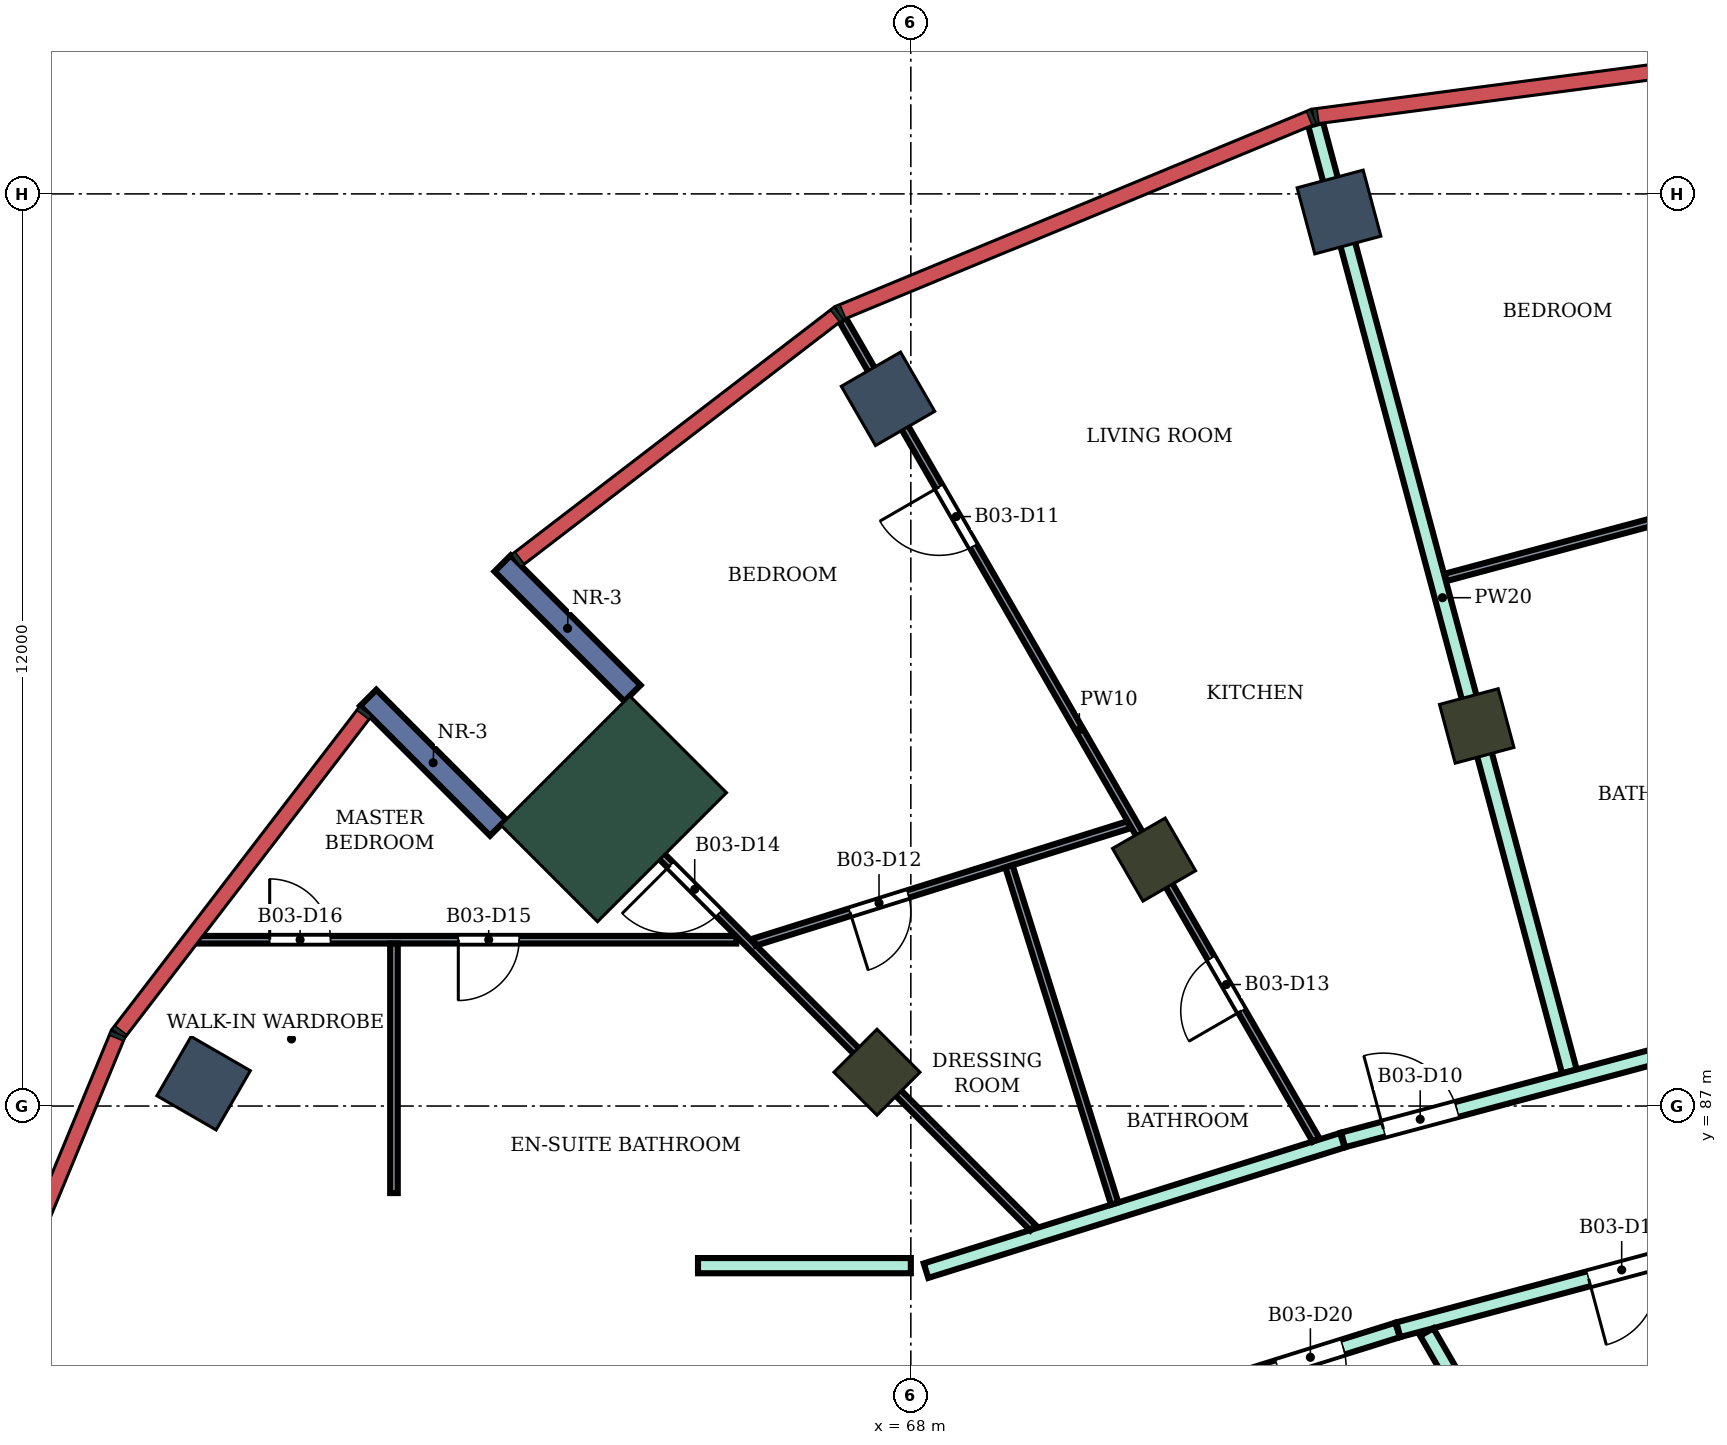
"""IFC4 building model, lengths in metres.
Left out: names, types, materials, properties, quantities, classifications, styles, units other than length and angle.
Written with IfcOpenShell. Run it as: python <this file> out.ifc"""

import sys

from ifc_helpers import new_model, si_unit, direction, frame, frame_2d, origin, origin_2d, place, context, subcontext, project, spatial, rectangle, extrude, element, fill, save


model = new_model("IFC4")
c1 = context("Model", 3, precision=1e-05, world=origin(), true_north=direction((0.0, 1.0)))
c2 = subcontext(c1, "Body", "Model", "MODEL_VIEW")
j1 = project(units=[si_unit("LENGTHUNIT", "METRE"), si_unit("PLANEANGLEUNIT", "RADIAN")], contexts=[c1])
p1 = place(None, origin())
s1 = spatial("IfcSite", under=j1, at=p1, CompositionType="ELEMENT")
p2 = place(p1, origin())
s2 = spatial("IfcBuilding", under=s1, at=p2, CompositionType="ELEMENT")
p3 = place(p2, frame((0.0, 0.0, 241.5)))
s3 = spatial("IfcBuildingStorey", under=s2, at=p3, CompositionType="ELEMENT", Elevation=241.5)
for number, where, z_axis, x_axis in (
    (1, (73.633, 98.762, 0.0), (0.0, 0.0, 1.0), (-0.259, 0.966, 0.0)),
    (2, (67.7, 96.304, 0.0), (0.0, 0.0, 1.0), (-0.5, 0.866, 0.0)),
    (3, (58.696, 87.3, 0.0), (0.0, 0.0, 1.0), (-0.866, 0.5, 0.0)),
):
    element("IfcColumn", number, at=place(p3, frame(where, z_axis=z_axis, x_axis=x_axis)), inside=s3, PredefinedType="COLUMN", context=c2, shape_type="SweptSolid", body=[
        extrude(rectangle(XDim=0.9, YDim=0.9, at=origin_2d()), origin(), (0.0, 0.0, 1.0), 4.2),
    ])
for number, where, z_axis, x_axis in (
    (4, (75.445, 92.0, 0.0), (0.0, 0.0, 1.0), (-0.259, 0.966, 0.0)),
    (5, (71.2, 90.242, 0.0), (0.0, 0.0, 1.0), (-0.5, 0.866, 0.0)),
    (6, (67.555, 87.445, 0.0), (0.0, 0.0, 1.0), (-0.707, 0.707, 0.0)),
):
    element("IfcColumn", number, at=place(p3, frame(where, z_axis=z_axis, x_axis=x_axis)), inside=s3, PredefinedType="COLUMN", context=c2, shape_type="SweptSolid", body=[
        extrude(rectangle(XDim=0.8, YDim=0.8, at=origin_2d()), origin(), (0.0, 0.0, 1.0), 4.2),
    ])
p4 = place(p3, frame((64.09, 90.91, 0.0), z_axis=(0.0, 0.0, 1.0), x_axis=(-0.707106781187, 0.707106781187, 0.0)))
e7 = element("IfcColumn", 7, at=p4, inside=s3, PredefinedType="COLUMN", context=c2, shape_type="SweptSolid", body=[
    extrude(rectangle(XDim=1.8, YDim=2.4, at=origin_2d()), origin(), (0.0, 0.0, 1.0), 4.2),
])
for number, where, z_axis, x_axis in (
    (8, (64.338, 92.43, 0.0), (0.0, 0.0, 1.0), (-0.707, 0.707, 0.0)),
    (9, (62.57, 90.662, 0.0), (0.0, 0.0, 1.0), (-0.707, 0.707, 0.0)),
):
    element("IfcWall", number, at=place(p3, frame(where, z_axis=z_axis, x_axis=x_axis)), inside=s3, PredefinedType="NOTDEFINED", context=c2, shape_type="SweptSolid", body=[
        extrude(rectangle(XDim=2.416, YDim=0.3, at=frame_2d((1.208, 0.0))), origin(), (0.0, 0.0, 1.0), 4.2),
    ])
p5 = place(p3, frame((65.2, 84.9, 0.0), z_axis=(0.0, 0.0, 1.0), x_axis=(1.0, 0.0, 0.0)))
e10 = element("IfcWall", 10, at=p5, inside=s3, PredefinedType="PARTITIONING", context=c2, shape_type="SweptSolid", body=[
    extrude(rectangle(XDim=2.8, YDim=0.2, at=frame_2d((1.4, 0.0))), origin(), (0.0, 0.0, 1.0), 3.75),
])
p6 = place(p3, frame((68.2, 84.834, 0.0), z_axis=(0.0, 0.0, 1.0), x_axis=(0.954272398161, 0.298938438661, 0.0)))
e11 = element("IfcWall", 11, at=p6, inside=s3, PredefinedType="PARTITIONING", context=c2, shape_type="SweptSolid", body=[
    extrude(rectangle(XDim=5.74, YDim=0.2, at=frame_2d((2.87, 0.0))), origin(), (0.0, 0.0, 1.0), 3.75),
])
p7 = place(p3, frame((72.1, 83.332, 0.0), z_axis=(0.0, 0.0, 1.0), x_axis=(0.954233106619, 0.299063836383, 0.0)))
e12 = element("IfcWall", 12, at=p7, inside=s3, PredefinedType="PARTITIONING", context=c2, shape_type="SweptSolid", body=[
    extrude(rectangle(XDim=2.414, YDim=0.2, at=frame_2d((1.207, 0.0))), origin(), (0.0, 0.0, 1.0), 3.75),
])
p8 = place(p7, frame((0.762, 0.0, 0.0)))
e13 = element("IfcOpeningElement", 13, at=p8, cuts=e12, PredefinedType="OPENING", context=c2, shape_type="SweptSolid", body=[
    extrude(rectangle(XDim=0.9, YDim=2.1, at=frame_2d((0.45, 1.05))), frame((0.0, 0.11, 0.0), z_axis=(0.0, -1.0, 0.0), x_axis=(1.0, 0.0, 0.0)), (0.0, 0.0, 1.0), 0.22),
])
p9 = place(p3, frame((73.325, 99.92, 0.0), z_axis=(0.0, 0.0, 1.0), x_axis=(0.258745857482, -0.965945433881, 0.0)))
e14 = element("IfcWall", 14, at=p9, inside=s3, PredefinedType="PARTITIONING", context=c2, shape_type="SweptSolid", body=[
    extrude(rectangle(XDim=12.904, YDim=0.2, at=frame_2d((6.452, 0.0))), origin(), (0.0, 0.0, 1.0), 3.75),
])
p10 = place(p3, frame((73.687, 86.554, 0.0), z_axis=(0.0, 0.0, 1.0), x_axis=(0.96595928904, 0.258694128106, 0.0)))
e15 = element("IfcWall", 15, at=p10, inside=s3, PredefinedType="PARTITIONING", context=c2, shape_type="SweptSolid", body=[
    extrude(rectangle(XDim=6.496, YDim=0.2, at=frame_2d((3.248, 0.0))), origin(), (0.0, 0.0, 1.0), 3.75),
])
p11 = place(p10, frame((0.55, 0.0, 0.0)))
e16 = element("IfcOpeningElement", 16, at=p11, cuts=e15, PredefinedType="OPENING", context=c2, shape_type="SweptSolid", body=[
    extrude(rectangle(XDim=1.0, YDim=2.1, at=frame_2d((0.5, 1.05))), frame((0.0, 0.11, 0.0), z_axis=(0.0, -1.0, 0.0), x_axis=(1.0, 0.0, 0.0)), (0.0, 0.0, 1.0), 0.22),
])
p12 = place(p3, frame((74.413, 84.057, 0.0), z_axis=(0.0, 0.0, 1.0), x_axis=(0.965972135939, 0.258646153246, 0.0)))
e17 = element("IfcWall", 17, at=p12, inside=s3, PredefinedType="PARTITIONING", context=c2, shape_type="SweptSolid", body=[
    extrude(rectangle(XDim=5.654, YDim=0.2, at=frame_2d((2.827, 0.0))), origin(), (0.0, 0.0, 1.0), 3.75),
])
p13 = place(p12, frame((2.593, 0.0, 0.0)))
e18 = element("IfcOpeningElement", 18, at=p13, cuts=e17, PredefinedType="OPENING", context=c2, shape_type="SweptSolid", body=[
    extrude(rectangle(XDim=0.9, YDim=2.1, at=frame_2d((0.45, 1.05))), frame((0.0, 0.11, 0.0), z_axis=(0.0, -1.0, 0.0), x_axis=(1.0, 0.0, 0.0)), (0.0, 0.0, 1.0), 0.22),
])
p14 = place(p3, frame((74.787, 84.027, 0.0), z_axis=(0.0, 0.0, 1.0), x_axis=(0.500079107518, -0.86597972622, 0.0)))
e19 = element("IfcWall", 19, at=p14, inside=s3, PredefinedType="PARTITIONING", context=c2, shape_type="SweptSolid", body=[
    extrude(rectangle(XDim=2.726, YDim=0.2, at=frame_2d((1.363, 0.0))), origin(), (0.0, 0.0, 1.0), 3.75),
])
p15 = place(p3, frame((58.6, 89.188, 0.0), z_axis=(0.0, 0.0, 1.0), x_axis=(1.0, 0.0, 0.0)))
e20 = element("IfcWall", 20, at=p15, inside=s3, PredefinedType="PARTITIONING", context=c2, shape_type="SweptSolid", body=[
    extrude(rectangle(XDim=7.103, YDim=0.1, at=frame_2d((3.551, 0.0))), origin(), (0.0, 0.0, 1.0), 3.75),
])
p16 = place(p15, frame((3.447, 0.0, 0.0)))
e21 = element("IfcOpeningElement", 21, at=p16, cuts=e20, PredefinedType="OPENING", context=c2, shape_type="SweptSolid", body=[
    extrude(rectangle(XDim=0.8, YDim=2.1, at=frame_2d((0.4, 1.05))), frame((0.0, 0.06, 0.0), z_axis=(0.0, -1.0, 0.0), x_axis=(1.0, 0.0, 0.0)), (0.0, 0.0, 1.0), 0.12),
])
p17 = place(p15, frame((0.965, 0.0, 0.0)))
e22 = element("IfcOpeningElement", 22, at=p17, cuts=e20, PredefinedType="OPENING", context=c2, shape_type="SweptSolid", body=[
    extrude(rectangle(XDim=0.8, YDim=2.1, at=frame_2d((0.4, 1.05))), frame((0.0, 0.06, 0.0), z_axis=(0.0, -1.0, 0.0), x_axis=(1.0, 0.0, 0.0)), (0.0, 0.0, 1.0), 0.12),
])
p18 = place(p3, frame((61.2, 85.855, 0.0), z_axis=(0.0, 0.0, 1.0), x_axis=(0.0, 1.0, 0.0)))
e23 = element("IfcWall", 23, at=p18, inside=s3, PredefinedType="PARTITIONING", context=c2, shape_type="SweptSolid", body=[
    extrude(rectangle(XDim=3.283, YDim=0.1, at=frame_2d((1.642, 0.0))), origin(), (0.0, 0.0, 1.0), 3.75),
])
p19 = place(p3, frame((63.599, 91.409, 0.0), z_axis=(0.0, 0.0, 1.0), x_axis=(0.706948776529, -0.707264750546, 0.0)))
e24 = element("IfcWall", 24, at=p19, inside=s3, PredefinedType="PARTITIONING", context=c2, shape_type="SweptSolid", body=[
    extrude(rectangle(XDim=8.499, YDim=0.1, at=frame_2d((4.25, 0.0))), origin(), (0.0, 0.0, 1.0), 3.75),
])
p20 = place(p19, frame((1.753, 0.0, 0.0)))
e25 = element("IfcOpeningElement", 25, at=p20, cuts=e24, PredefinedType="OPENING", context=c2, shape_type="SweptSolid", body=[
    extrude(rectangle(XDim=0.9, YDim=2.1, at=frame_2d((0.45, 1.05))), frame((0.0, 0.06, 0.0), z_axis=(0.0, -1.0, 0.0), x_axis=(1.0, 0.0, 0.0)), (0.0, 0.0, 1.0), 0.12),
])
p21 = place(p3, frame((65.944, 89.157, 0.0), z_axis=(0.0, 0.0, 1.0), x_axis=(0.954248987961, 0.299013158531, 0.0)))
e26 = element("IfcWall", 26, at=p21, inside=s3, PredefinedType="PARTITIONING", context=c2, shape_type="SweptSolid", body=[
    extrude(rectangle(XDim=5.159, YDim=0.1, at=frame_2d((2.58, 0.0))), origin(), (0.0, 0.0, 1.0), 3.75),
])
p22 = place(p21, frame((1.316, 0.0, 0.0)))
e27 = element("IfcOpeningElement", 27, at=p22, cuts=e26, PredefinedType="OPENING", context=c2, shape_type="SweptSolid", body=[
    extrude(rectangle(XDim=0.8, YDim=2.1, at=frame_2d((0.4, 1.05))), frame((0.0, 0.06, 0.0), z_axis=(0.0, -1.0, 0.0), x_axis=(1.0, 0.0, 0.0)), (0.0, 0.0, 1.0), 0.12),
])
p23 = place(p3, frame((67.104, 97.343, 0.0), z_axis=(0.0, 0.0, 1.0), x_axis=(0.499891560959, -0.866088002043, 0.0)))
e28 = element("IfcWall", 28, at=p23, inside=s3, PredefinedType="PARTITIONING", context=c2, shape_type="SweptSolid", body=[
    extrude(rectangle(XDim=12.456, YDim=0.1, at=frame_2d((6.228, 0.0))), origin(), (0.0, 0.0, 1.0), 3.75),
])
p24 = place(p23, frame((2.538, 0.0, 0.0)))
e29 = element("IfcOpeningElement", 29, at=p24, cuts=e28, PredefinedType="OPENING", context=c2, shape_type="SweptSolid", body=[
    extrude(rectangle(XDim=0.9, YDim=2.1, at=frame_2d((0.45, 1.05))), frame((0.0, 0.06, 0.0), z_axis=(0.0, -1.0, 0.0), x_axis=(1.0, 0.0, 0.0)), (0.0, 0.0, 1.0), 0.12),
])
p25 = place(p23, frame((9.697, 0.0, 0.0)))
e30 = element("IfcOpeningElement", 30, at=p25, cuts=e28, PredefinedType="OPENING", context=c2, shape_type="SweptSolid", body=[
    extrude(rectangle(XDim=0.8, YDim=2.1, at=frame_2d((0.4, 1.05))), frame((0.0, 0.06, 0.0), z_axis=(0.0, -1.0, 0.0), x_axis=(1.0, 0.0, 0.0)), (0.0, 0.0, 1.0), 0.12),
])
p26 = place(p3, frame((69.291, 90.153, 0.0), z_axis=(0.0, 0.0, 1.0), x_axis=(0.299165743488, -0.954201162189, 0.0)))
e31 = element("IfcWall", 31, at=p26, inside=s3, PredefinedType="PARTITIONING", context=c2, shape_type="SweptSolid", body=[
    extrude(rectangle(XDim=4.65, YDim=0.1, at=frame_2d((2.325, 0.0))), origin(), (0.0, 0.0, 1.0), 3.75),
])
p27 = place(p3, frame((75.035, 93.955, 0.0), z_axis=(0.0, 0.0, 1.0), x_axis=(0.965868648254, 0.259032342228, 0.0)))
e32 = element("IfcWall", 32, at=p27, inside=s3, PredefinedType="PARTITIONING", context=c2, shape_type="SweptSolid", body=[
    extrude(rectangle(XDim=5.08, YDim=0.1, at=frame_2d((2.54, 0.0))), origin(), (0.0, 0.0, 1.0), 3.75),
])
p28 = place(p11, origin())
e33 = element("IfcDoor", 33, at=p28, inside=s3, OperationType="SINGLE_SWING_LEFT", PredefinedType="DOOR", context=c2, shape_type="SweptSolid", body=[
    extrude(rectangle(XDim=1.0, YDim=2.1, at=frame_2d((0.5, 1.05))), frame((0.0, 0.025, 0.0), z_axis=(0.0, -1.0, 0.0), x_axis=(1.0, 0.0, 0.0)), (0.0, 0.0, 1.0), 0.05),
])
fill(e16, e33)
p29 = place(p24, frame((0.9, 0.0, 0.0), z_axis=(0.0, 0.0, 1.0), x_axis=(-1.0, 0.0, 0.0)))
e34 = element("IfcDoor", 34, at=p29, inside=s3, OperationType="SINGLE_SWING_RIGHT", PredefinedType="DOOR", context=c2, shape_type="SweptSolid", body=[
    extrude(rectangle(XDim=0.9, YDim=2.1, at=frame_2d((0.45, 1.05))), frame((0.0, 0.025, 0.0), z_axis=(0.0, -1.0, 0.0), x_axis=(1.0, 0.0, 0.0)), (0.0, 0.0, 1.0), 0.05),
])
fill(e29, e34)
p30 = place(p22, frame((0.8, 0.0, 0.0), z_axis=(0.0, 0.0, 1.0), x_axis=(-1.0, 0.0, 0.0)))
e35 = element("IfcDoor", 35, at=p30, inside=s3, OperationType="SINGLE_SWING_RIGHT", PredefinedType="DOOR", context=c2, shape_type="SweptSolid", body=[
    extrude(rectangle(XDim=0.8, YDim=2.1, at=frame_2d((0.4, 1.05))), frame((0.0, 0.025, 0.0), z_axis=(0.0, -1.0, 0.0), x_axis=(1.0, 0.0, 0.0)), (0.0, 0.0, 1.0), 0.05),
])
fill(e27, e35)
p31 = place(p25, frame((0.8, 0.0, 0.0), z_axis=(0.0, 0.0, 1.0), x_axis=(-1.0, 0.0, 0.0)))
e36 = element("IfcDoor", 36, at=p31, inside=s3, OperationType="SINGLE_SWING_LEFT", PredefinedType="DOOR", context=c2, shape_type="SweptSolid", body=[
    extrude(rectangle(XDim=0.8, YDim=2.1, at=frame_2d((0.4, 1.05))), frame((0.0, 0.025, 0.0), z_axis=(0.0, -1.0, 0.0), x_axis=(1.0, 0.0, 0.0)), (0.0, 0.0, 1.0), 0.05),
])
fill(e30, e36)
p32 = place(p20, frame((0.9, 0.0, 0.0), z_axis=(0.0, 0.0, 1.0), x_axis=(-1.0, 0.0, 0.0)))
e37 = element("IfcDoor", 37, at=p32, inside=s3, OperationType="SINGLE_SWING_RIGHT", PredefinedType="DOOR", context=c2, shape_type="SweptSolid", body=[
    extrude(rectangle(XDim=0.9, YDim=2.1, at=frame_2d((0.45, 1.05))), frame((0.0, 0.025, 0.0), z_axis=(0.0, -1.0, 0.0), x_axis=(1.0, 0.0, 0.0)), (0.0, 0.0, 1.0), 0.05),
])
fill(e25, e37)
p33 = place(p16, frame((0.8, 0.0, 0.0), z_axis=(0.0, 0.0, 1.0), x_axis=(-1.0, 0.0, 0.0)))
e38 = element("IfcDoor", 38, at=p33, inside=s3, OperationType="SINGLE_SWING_RIGHT", PredefinedType="DOOR", context=c2, shape_type="SweptSolid", body=[
    extrude(rectangle(XDim=0.8, YDim=2.1, at=frame_2d((0.4, 1.05))), frame((0.0, 0.025, 0.0), z_axis=(0.0, -1.0, 0.0), x_axis=(1.0, 0.0, 0.0)), (0.0, 0.0, 1.0), 0.05),
])
fill(e21, e38)
p34 = place(p17, origin())
e39 = element("IfcDoor", 39, at=p34, inside=s3, OperationType="SINGLE_SWING_LEFT", PredefinedType="DOOR", context=c2, shape_type="SweptSolid", body=[
    extrude(rectangle(XDim=0.8, YDim=2.1, at=frame_2d((0.4, 1.05))), frame((0.0, 0.025, 0.0), z_axis=(0.0, -1.0, 0.0), x_axis=(1.0, 0.0, 0.0)), (0.0, 0.0, 1.0), 0.05),
])
fill(e22, e39)
p35 = place(p13, frame((0.9, 0.0, 0.0), z_axis=(0.0, 0.0, 1.0), x_axis=(-1.0, 0.0, 0.0)))
e40 = element("IfcDoor", 40, at=p35, inside=s3, OperationType="SINGLE_SWING_RIGHT", PredefinedType="DOOR", context=c2, shape_type="SweptSolid", body=[
    extrude(rectangle(XDim=0.9, YDim=2.1, at=frame_2d((0.45, 1.05))), frame((0.0, 0.025, 0.0), z_axis=(0.0, -1.0, 0.0), x_axis=(1.0, 0.0, 0.0)), (0.0, 0.0, 1.0), 0.05),
])
fill(e18, e40)
p36 = place(p8, frame((0.9, 0.0, 0.0), z_axis=(0.0, 0.0, 1.0), x_axis=(-1.0, 0.0, 0.0)))
e41 = element("IfcDoor", 41, at=p36, inside=s3, OperationType="SINGLE_SWING_RIGHT", PredefinedType="DOOR", context=c2, shape_type="SweptSolid", body=[
    extrude(rectangle(XDim=0.9, YDim=2.1, at=frame_2d((0.45, 1.05))), frame((0.0, 0.025, 0.0), z_axis=(0.0, -1.0, 0.0), x_axis=(1.0, 0.0, 0.0)), (0.0, 0.0, 1.0), 0.05),
])
fill(e13, e41)
save(model, sys.argv[1])
